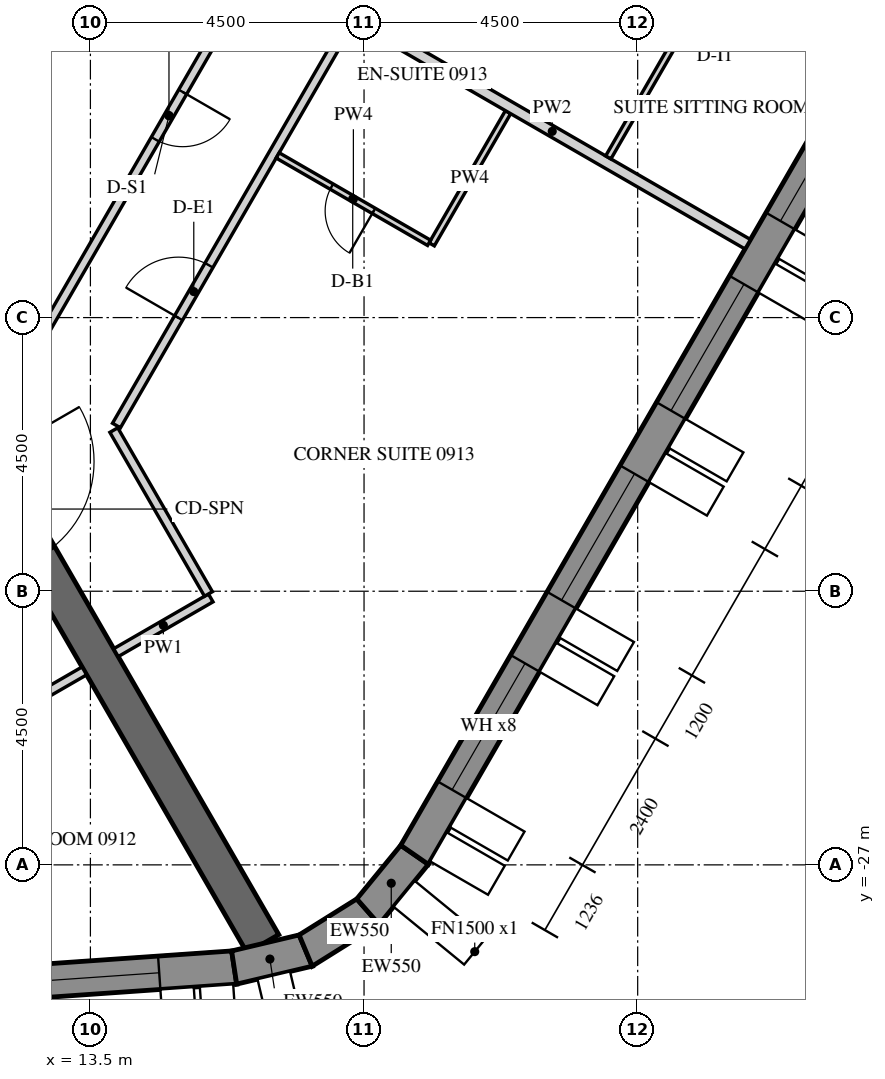
"""IFC4 building model, lengths in metres.
Left out: names, types, materials, properties, quantities, classifications, styles, units other than length and angle.
Written with IfcOpenShell. Run it as: python <this file> out.ifc"""

import sys

from ifc_helpers import new_model, si_unit, direction, frame, frame_2d, origin, place, context, subcontext, project, spatial, polyline, rectangle, outline, extrude, element, fill, save


model = new_model("IFC4")
c1 = context("Model", 3, precision=1e-05, world=origin(), true_north=direction((0.0, 1.0)))
c2 = subcontext(c1, "Body", "Model", "MODEL_VIEW")
j1 = project(units=[si_unit("LENGTHUNIT", "METRE"), si_unit("PLANEANGLEUNIT", "RADIAN")], contexts=[c1])
p1 = place(None, origin())
s1 = spatial("IfcSite", under=j1, at=p1, CompositionType="ELEMENT")
p2 = place(p1, origin())
s2 = spatial("IfcBuilding", under=s1, at=p2, CompositionType="ELEMENT")
p3 = place(p2, frame((0.0, 0.0, 123.3)))
s3 = spatial("IfcBuildingStorey", under=s2, at=p3, CompositionType="ELEMENT", Elevation=123.3)
p4 = place(p3, frame((-14.134, -30.786, -0.15), z_axis=(0.0, 0.0, 1.0), x_axis=(0.997564037441, 0.069756657061, 0.0)))
e1 = element("IfcWall", 1, at=p4, inside=s3, PredefinedType="SOLIDWALL", context=c2, shape_type="SweptSolid", body=[
    extrude(outline(polyline([(-0.026, -0.275), (30.094, -0.275), (30.049, 0.275), (0.026, 0.275), (-0.026, -0.275)])), origin(), (0.0, 0.0, 1.0), 3.9),
])
p5 = place(p4, frame((1.236, 0.0, 1.05)))
e2 = element("IfcOpeningElement", 2, at=p5, cuts=e1, PredefinedType="OPENING", context=c2, shape_type="SweptSolid", body=[
    extrude(rectangle(XDim=2.4, YDim=2.4, at=frame_2d((1.2, 1.2))), frame((0.0, 0.285, 0.0), z_axis=(0.0, -1.0, 0.0), x_axis=(1.0, 0.0, 0.0)), (0.0, 0.0, 1.0), 0.57),
])
p6 = place(p4, frame((4.835, 0.0, 1.05)))
e3 = element("IfcOpeningElement", 3, at=p6, cuts=e1, PredefinedType="OPENING", context=c2, shape_type="SweptSolid", body=[
    extrude(rectangle(XDim=2.4, YDim=2.4, at=frame_2d((1.2, 1.2))), frame((0.0, 0.285, 0.0), z_axis=(0.0, -1.0, 0.0), x_axis=(1.0, 0.0, 0.0)), (0.0, 0.0, 1.0), 0.57),
])
p7 = place(p4, frame((8.436, 0.0, 1.05)))
e4 = element("IfcOpeningElement", 4, at=p7, cuts=e1, PredefinedType="OPENING", context=c2, shape_type="SweptSolid", body=[
    extrude(rectangle(XDim=2.4, YDim=2.4, at=frame_2d((1.2, 1.2))), frame((0.0, 0.285, 0.0), z_axis=(0.0, -1.0, 0.0), x_axis=(1.0, 0.0, 0.0)), (0.0, 0.0, 1.0), 0.57),
])
p8 = place(p4, frame((12.035, 0.0, 1.05)))
e5 = element("IfcOpeningElement", 5, at=p8, cuts=e1, PredefinedType="OPENING", context=c2, shape_type="SweptSolid", body=[
    extrude(rectangle(XDim=2.4, YDim=2.4, at=frame_2d((1.2, 1.2))), frame((0.0, 0.285, 0.0), z_axis=(0.0, -1.0, 0.0), x_axis=(1.0, 0.0, 0.0)), (0.0, 0.0, 1.0), 0.57),
])
p9 = place(p4, frame((15.635, 0.0, 1.05)))
e6 = element("IfcOpeningElement", 6, at=p9, cuts=e1, PredefinedType="OPENING", context=c2, shape_type="SweptSolid", body=[
    extrude(rectangle(XDim=2.4, YDim=2.4, at=frame_2d((1.2, 1.2))), frame((0.0, 0.285, 0.0), z_axis=(0.0, -1.0, 0.0), x_axis=(1.0, 0.0, 0.0)), (0.0, 0.0, 1.0), 0.57),
])
p10 = place(p4, frame((19.236, 0.0, 1.05)))
e7 = element("IfcOpeningElement", 7, at=p10, cuts=e1, PredefinedType="OPENING", context=c2, shape_type="SweptSolid", body=[
    extrude(rectangle(XDim=2.4, YDim=2.4, at=frame_2d((1.2, 1.2))), frame((0.0, 0.285, 0.0), z_axis=(0.0, -1.0, 0.0), x_axis=(1.0, 0.0, 0.0)), (0.0, 0.0, 1.0), 0.57),
])
p11 = place(p4, frame((22.835, 0.0, 1.05)))
e8 = element("IfcOpeningElement", 8, at=p11, cuts=e1, PredefinedType="OPENING", context=c2, shape_type="SweptSolid", body=[
    extrude(rectangle(XDim=2.4, YDim=2.4, at=frame_2d((1.2, 1.2))), frame((0.0, 0.285, 0.0), z_axis=(0.0, -1.0, 0.0), x_axis=(1.0, 0.0, 0.0)), (0.0, 0.0, 1.0), 0.57),
])
p12 = place(p4, frame((26.436, 0.0, 1.05)))
e9 = element("IfcOpeningElement", 9, at=p12, cuts=e1, PredefinedType="OPENING", context=c2, shape_type="SweptSolid", body=[
    extrude(rectangle(XDim=2.4, YDim=2.4, at=frame_2d((1.2, 1.2))), frame((0.0, 0.285, 0.0), z_axis=(0.0, -1.0, 0.0), x_axis=(1.0, 0.0, 0.0)), (0.0, 0.0, 1.0), 0.57),
])
p13 = place(p3, frame((15.864, -28.688, -0.15), z_axis=(0.0, 0.0, 1.0), x_axis=(0.973063591128, 0.230536868247, 0.0)))
e10 = element("IfcWall", 10, at=p13, inside=s3, PredefinedType="SOLIDWALL", context=c2, shape_type="SweptSolid", body=[
    extrude(outline(polyline([(-0.022, -0.275), (1.253, -0.275), (1.163, 0.275), (0.022, 0.275), (-0.022, -0.275)])), origin(), (0.0, 0.0, 1.0), 3.9),
])
p14 = place(p3, frame((17.04, -28.41, -0.15), z_axis=(0.0, 0.0, 1.0), x_axis=(0.847952888306, 0.530071598195, 0.0)))
e11 = element("IfcWall", 11, at=p14, inside=s3, PredefinedType="SOLIDWALL", context=c2, shape_type="SweptSolid", body=[
    extrude(outline(polyline([(-0.045, -0.275), (1.253, -0.275), (1.163, 0.275), (0.045, 0.275), (-0.045, -0.275)])), origin(), (0.0, 0.0, 1.0), 3.9),
])
p15 = place(p3, frame((18.064, -27.769, -0.15), z_axis=(0.0, 0.0, 1.0), x_axis=(0.633842757806, 0.773461930787, 0.0)))
e12 = element("IfcWall", 12, at=p15, inside=s3, PredefinedType="SOLIDWALL", context=c2, shape_type="SweptSolid", body=[
    extrude(outline(polyline([(-0.045, -0.275), (1.231, -0.275), (1.186, 0.275), (0.045, 0.275), (-0.045, -0.275)])), origin(), (0.0, 0.0, 1.0), 3.9),
])
p16 = place(p3, frame((18.83, -26.835, -0.15), z_axis=(0.0, 0.0, 1.0), x_axis=(0.500003800416, 0.866023209602, 0.0)))
e13 = element("IfcWall", 13, at=p16, inside=s3, PredefinedType="SOLIDWALL", context=c2, shape_type="SweptSolid", body=[
    extrude(outline(polyline([(-0.022, -0.275), (30.097, -0.275), (30.045, 0.275), (0.022, 0.275), (-0.022, -0.275)])), origin(), (0.0, 0.0, 1.0), 3.9),
])
p17 = place(p16, frame((1.236, 0.0, 1.05)))
e14 = element("IfcOpeningElement", 14, at=p17, cuts=e13, PredefinedType="OPENING", context=c2, shape_type="SweptSolid", body=[
    extrude(rectangle(XDim=2.4, YDim=2.4, at=frame_2d((1.2, 1.2))), frame((0.0, 0.285, 0.0), z_axis=(0.0, -1.0, 0.0), x_axis=(1.0, 0.0, 0.0)), (0.0, 0.0, 1.0), 0.57),
])
p18 = place(p16, frame((4.835, 0.0, 1.05)))
e15 = element("IfcOpeningElement", 15, at=p18, cuts=e13, PredefinedType="OPENING", context=c2, shape_type="SweptSolid", body=[
    extrude(rectangle(XDim=2.4, YDim=2.4, at=frame_2d((1.2, 1.2))), frame((0.0, 0.285, 0.0), z_axis=(0.0, -1.0, 0.0), x_axis=(1.0, 0.0, 0.0)), (0.0, 0.0, 1.0), 0.57),
])
p19 = place(p16, frame((8.436, 0.0, 1.05)))
e16 = element("IfcOpeningElement", 16, at=p19, cuts=e13, PredefinedType="OPENING", context=c2, shape_type="SweptSolid", body=[
    extrude(rectangle(XDim=2.4, YDim=2.4, at=frame_2d((1.2, 1.2))), frame((0.0, 0.285, 0.0), z_axis=(0.0, -1.0, 0.0), x_axis=(1.0, 0.0, 0.0)), (0.0, 0.0, 1.0), 0.57),
])
p20 = place(p16, frame((12.035, 0.0, 1.05)))
e17 = element("IfcOpeningElement", 17, at=p20, cuts=e13, PredefinedType="OPENING", context=c2, shape_type="SweptSolid", body=[
    extrude(rectangle(XDim=2.4, YDim=2.4, at=frame_2d((1.2, 1.2))), frame((0.0, 0.285, 0.0), z_axis=(0.0, -1.0, 0.0), x_axis=(1.0, 0.0, 0.0)), (0.0, 0.0, 1.0), 0.57),
])
p21 = place(p16, frame((15.635, 0.0, 1.05)))
e18 = element("IfcOpeningElement", 18, at=p21, cuts=e13, PredefinedType="OPENING", context=c2, shape_type="SweptSolid", body=[
    extrude(rectangle(XDim=2.4, YDim=2.4, at=frame_2d((1.2, 1.2))), frame((0.0, 0.285, 0.0), z_axis=(0.0, -1.0, 0.0), x_axis=(1.0, 0.0, 0.0)), (0.0, 0.0, 1.0), 0.57),
])
p22 = place(p16, frame((19.236, 0.0, 1.05)))
e19 = element("IfcOpeningElement", 19, at=p22, cuts=e13, PredefinedType="OPENING", context=c2, shape_type="SweptSolid", body=[
    extrude(rectangle(XDim=2.4, YDim=2.4, at=frame_2d((1.2, 1.2))), frame((0.0, 0.285, 0.0), z_axis=(0.0, -1.0, 0.0), x_axis=(1.0, 0.0, 0.0)), (0.0, 0.0, 1.0), 0.57),
])
p23 = place(p16, frame((22.835, 0.0, 1.05)))
e20 = element("IfcOpeningElement", 20, at=p23, cuts=e13, PredefinedType="OPENING", context=c2, shape_type="SweptSolid", body=[
    extrude(rectangle(XDim=2.4, YDim=2.4, at=frame_2d((1.2, 1.2))), frame((0.0, 0.285, 0.0), z_axis=(0.0, -1.0, 0.0), x_axis=(1.0, 0.0, 0.0)), (0.0, 0.0, 1.0), 0.57),
])
p24 = place(p16, frame((26.436, 0.0, 1.05)))
e21 = element("IfcOpeningElement", 21, at=p24, cuts=e13, PredefinedType="OPENING", context=c2, shape_type="SweptSolid", body=[
    extrude(rectangle(XDim=2.4, YDim=2.4, at=frame_2d((1.2, 1.2))), frame((0.0, 0.285, 0.0), z_axis=(0.0, -1.0, 0.0), x_axis=(1.0, 0.0, 0.0)), (0.0, 0.0, 1.0), 0.57),
])
p25 = place(p3, frame((7.91, -13.7, -0.15), z_axis=(0.0, 0.0, 1.0), x_axis=(0.499999880136, 0.866025472988, 0.0)))
e22 = element("IfcWall", 22, at=p25, inside=s3, PredefinedType="SHEAR", context=c2, shape_type="SweptSolid", body=[
    extrude(outline(polyline([(-0.173, -0.3), (15.993, -0.3), (15.646, 0.3), (0.173, 0.3), (-0.173, -0.3)])), origin(), (0.0, 0.0, 1.0), 3.9),
])
p26 = place(p25, frame((7.039, 0.0, 0.15)))
e23 = element("IfcOpeningElement", 23, at=p26, cuts=e22, PredefinedType="OPENING", context=c2, shape_type="SweptSolid", body=[
    extrude(rectangle(XDim=1.8, YDim=2.4, at=frame_2d((0.9, 1.2))), frame((0.0, 0.31, 0.0), z_axis=(0.0, -1.0, 0.0), x_axis=(1.0, 0.0, 0.0)), (0.0, 0.0, 1.0), 0.62),
])
p27 = place(p3, frame((8.083, -14.0, -0.15), z_axis=(0.0, 0.0, 1.0), x_axis=(0.499997680643, -0.866026742862, 0.0)))
e24 = element("IfcWall", 24, at=p27, inside=s3, PredefinedType="SHEAR", context=c2, shape_type="SweptSolid", body=[
    extrude(rectangle(XDim=16.509, YDim=0.6, at=frame_2d((8.254, 0.0))), origin(), (0.0, 0.0, 1.0), 3.9),
])
p28 = place(p27, frame((7.354, 0.0, 0.15)))
e25 = element("IfcOpeningElement", 25, at=p28, cuts=e24, PredefinedType="OPENING", context=c2, shape_type="SweptSolid", body=[
    extrude(rectangle(XDim=1.8, YDim=2.4, at=frame_2d((0.9, 1.2))), frame((0.0, 0.31, 0.0), z_axis=(0.0, -1.0, 0.0), x_axis=(1.0, 0.0, 0.0)), (0.0, 0.0, 1.0), 0.62),
])
p29 = place(p3, frame((11.906, -24.673, 0.0), z_axis=(0.0, 0.0, 1.0), x_axis=(0.866013532718, 0.500020560727, 0.0)))
e26 = element("IfcWall", 26, at=p29, inside=s3, PredefinedType="PARTITIONING", context=c2, shape_type="SweptSolid", body=[
    extrude(rectangle(XDim=1.725, YDim=0.15, at=frame_2d((0.863, 0.0))), origin(), (0.0, 0.0, 1.0), 2.988),
])
p30 = place(p3, frame((13.92, -23.51, 0.0), z_axis=(0.0, 0.0, 1.0), x_axis=(0.866047807691, 0.499961193289, 0.0)))
e27 = element("IfcWall", 27, at=p30, inside=s3, PredefinedType="PARTITIONING", context=c2, shape_type="SweptSolid", body=[
    extrude(rectangle(XDim=1.8, YDim=0.15, at=frame_2d((0.9, 0.0))), origin(), (0.0, 0.0, 1.0), 2.988),
])
p31 = place(p3, frame((15.441, -22.545, 0.0), z_axis=(0.0, 0.0, 1.0), x_axis=(-0.500037089193, 0.86600398927, 0.0)))
e28 = element("IfcWall", 28, at=p31, inside=s3, PredefinedType="PARTITIONING", context=c2, shape_type="SweptSolid", body=[
    extrude(rectangle(XDim=3.112, YDim=0.15, at=frame_2d((1.556, 0.0))), origin(), (0.0, 0.0, 1.0), 2.988),
])
p32 = place(p3, frame((13.928, -19.775, 0.0), z_axis=(0.0, 0.0, 1.0), x_axis=(0.50000450071, 0.866022805283, 0.0)))
e29 = element("IfcWall", 29, at=p32, inside=s3, PredefinedType="PARTITIONING", context=c2, shape_type="SweptSolid", body=[
    extrude(rectangle(XDim=23.877, YDim=0.15, at=frame_2d((11.938, 0.0))), origin(), (0.0, 0.0, 1.0), 2.988),
])
p33 = place(p32, frame((2.043, 0.0, 0.0)))
e30 = element("IfcOpeningElement", 30, at=p33, cuts=e29, PredefinedType="OPENING", context=c2, shape_type="SweptSolid", body=[
    extrude(rectangle(XDim=1.0, YDim=2.1, at=frame_2d((0.5, 1.05))), frame((0.0, 0.085, 0.0), z_axis=(0.0, -1.0, 0.0), x_axis=(1.0, 0.0, 0.0)), (0.0, 0.0, 1.0), 0.17),
])
p34 = place(p32, frame((13.272, 0.0, 0.0)))
e31 = element("IfcOpeningElement", 31, at=p34, cuts=e29, PredefinedType="OPENING", context=c2, shape_type="SweptSolid", body=[
    extrude(rectangle(XDim=1.0, YDim=2.1, at=frame_2d((0.5, 1.05))), frame((0.0, 0.085, 0.0), z_axis=(0.0, -1.0, 0.0), x_axis=(1.0, 0.0, 0.0)), (0.0, 0.0, 1.0), 0.17),
])
p35 = place(p3, frame((16.902, -11.024, 0.0), z_axis=(0.0, 0.0, 1.0), x_axis=(-0.499999527968, -0.866025676312, 0.0)))
e32 = element("IfcWall", 32, at=p35, inside=s3, PredefinedType="PARTITIONING", context=c2, shape_type="SweptSolid", body=[
    extrude(rectangle(XDim=8.441, YDim=0.15, at=frame_2d((4.22, 0.0))), origin(), (0.0, 0.0, 1.0), 2.988),
])
p36 = place(p35, frame((3.771, 0.0, 0.0)))
e33 = element("IfcOpeningElement", 33, at=p36, cuts=e32, PredefinedType="OPENING", context=c2, shape_type="SweptSolid", body=[
    extrude(rectangle(XDim=0.9, YDim=2.1, at=frame_2d((0.45, 1.05))), frame((0.0, 0.085, 0.0), z_axis=(0.0, -1.0, 0.0), x_axis=(1.0, 0.0, 0.0)), (0.0, 0.0, 1.0), 0.17),
])
p37 = place(p3, frame((20.368, -14.622, 0.0), z_axis=(0.0, 0.0, 1.0), x_axis=(-0.50001992892, -0.866013897511, 0.0)))
e34 = element("IfcWall", 34, at=p37, inside=s3, PredefinedType="PARTITIONING", context=c2, shape_type="SweptSolid", body=[
    extrude(rectangle(XDim=2.51, YDim=0.1, at=frame_2d((1.255, 0.0))), origin(), (0.0, 0.0, 1.0), 2.988),
])
p38 = place(p3, frame((19.07, -16.771, 0.0), z_axis=(0.0, 0.0, 1.0), x_axis=(-0.866018712932, 0.500011588718, 0.0)))
e35 = element("IfcWall", 35, at=p38, inside=s3, PredefinedType="PARTITIONING", context=c2, shape_type="SweptSolid", body=[
    extrude(rectangle(XDim=2.875, YDim=0.1, at=frame_2d((1.438, 0.0))), origin(), (0.0, 0.0, 1.0), 2.988),
])
p39 = place(p38, frame((1.05, 0.0, 0.0)))
e36 = element("IfcOpeningElement", 36, at=p39, cuts=e35, PredefinedType="OPENING", context=c2, shape_type="SweptSolid", body=[
    extrude(rectangle(XDim=0.8, YDim=2.1, at=frame_2d((0.4, 1.05))), frame((0.0, 0.06, 0.0), z_axis=(0.0, -1.0, 0.0), x_axis=(1.0, 0.0, 0.0)), (0.0, 0.0, 1.0), 0.12),
])
p40 = place(p3, frame((24.31, -16.794, 0.0), z_axis=(0.0, 0.0, 1.0), x_axis=(-0.866022965479, 0.500004223245, 0.0)))
e37 = element("IfcWall", 37, at=p40, inside=s3, PredefinedType="PARTITIONING", context=c2, shape_type="SweptSolid", body=[
    extrude(rectangle(XDim=7.425, YDim=0.18, at=frame_2d((3.713, 0.0))), origin(), (0.0, 0.0, 1.0), 2.988),
])
p41 = place(p3, frame((22.017, -15.366, 0.0), z_axis=(0.0, 0.0, 1.0), x_axis=(0.5000167099, 0.866015756104, 0.0)))
e38 = element("IfcWall", 38, at=p41, inside=s3, PredefinedType="PARTITIONING", context=c2, shape_type="SweptSolid", body=[
    extrude(rectangle(XDim=7.11, YDim=0.1, at=frame_2d((3.555, 0.0))), origin(), (0.0, 0.0, 1.0), 2.988),
])
p42 = place(p41, frame((3.06, 0.0, 0.0)))
e39 = element("IfcOpeningElement", 39, at=p42, cuts=e38, PredefinedType="OPENING", context=c2, shape_type="SweptSolid", body=[
    extrude(rectangle(XDim=0.9, YDim=2.1, at=frame_2d((0.45, 1.05))), frame((0.0, 0.06, 0.0), z_axis=(0.0, -1.0, 0.0), x_axis=(1.0, 0.0, 0.0)), (0.0, 0.0, 1.0), 0.12),
])
p43 = place(p12, frame((0.0, 0.205, 0.0)))
e40 = element("IfcWindow", 40, at=p43, inside=s3, PartitioningType="DOUBLE_PANEL_VERTICAL", PredefinedType="WINDOW", context=c2, shape_type="SweptSolid", body=[
    extrude(rectangle(XDim=2.4, YDim=2.4, at=frame_2d((1.2, 1.2))), frame((0.0, 0.03, 0.0), z_axis=(0.0, -1.0, 0.0), x_axis=(1.0, 0.0, 0.0)), (0.0, 0.0, 1.0), 0.06),
])
fill(e9, e40)
p44 = place(p17, frame((0.0, 0.205, 0.0)))
e41 = element("IfcWindow", 41, at=p44, inside=s3, PartitioningType="DOUBLE_PANEL_VERTICAL", PredefinedType="WINDOW", context=c2, shape_type="SweptSolid", body=[
    extrude(rectangle(XDim=2.4, YDim=2.4, at=frame_2d((1.2, 1.2))), frame((0.0, 0.03, 0.0), z_axis=(0.0, -1.0, 0.0), x_axis=(1.0, 0.0, 0.0)), (0.0, 0.0, 1.0), 0.06),
])
fill(e14, e41)
p45 = place(p18, frame((0.0, 0.205, 0.0)))
e42 = element("IfcWindow", 42, at=p45, inside=s3, PartitioningType="DOUBLE_PANEL_VERTICAL", PredefinedType="WINDOW", context=c2, shape_type="SweptSolid", body=[
    extrude(rectangle(XDim=2.4, YDim=2.4, at=frame_2d((1.2, 1.2))), frame((0.0, 0.03, 0.0), z_axis=(0.0, -1.0, 0.0), x_axis=(1.0, 0.0, 0.0)), (0.0, 0.0, 1.0), 0.06),
])
fill(e15, e42)
p46 = place(p19, frame((0.0, 0.205, 0.0)))
e43 = element("IfcWindow", 43, at=p46, inside=s3, PartitioningType="DOUBLE_PANEL_VERTICAL", PredefinedType="WINDOW", context=c2, shape_type="SweptSolid", body=[
    extrude(rectangle(XDim=2.4, YDim=2.4, at=frame_2d((1.2, 1.2))), frame((0.0, 0.03, 0.0), z_axis=(0.0, -1.0, 0.0), x_axis=(1.0, 0.0, 0.0)), (0.0, 0.0, 1.0), 0.06),
])
fill(e16, e43)
p47 = place(p20, frame((0.0, 0.205, 0.0)))
e44 = element("IfcWindow", 44, at=p47, inside=s3, PartitioningType="DOUBLE_PANEL_VERTICAL", PredefinedType="WINDOW", context=c2, shape_type="SweptSolid", body=[
    extrude(rectangle(XDim=2.4, YDim=2.4, at=frame_2d((1.2, 1.2))), frame((0.0, 0.03, 0.0), z_axis=(0.0, -1.0, 0.0), x_axis=(1.0, 0.0, 0.0)), (0.0, 0.0, 1.0), 0.06),
])
fill(e17, e44)
p48 = place(p33, origin())
e45 = element("IfcDoor", 45, at=p48, inside=s3, OperationType="SINGLE_SWING_RIGHT", PredefinedType="DOOR", context=c2, shape_type="SweptSolid", body=[
    extrude(rectangle(XDim=1.0, YDim=2.1, at=frame_2d((0.5, 1.05))), frame((0.0, 0.025, 0.0), z_axis=(0.0, -1.0, 0.0), x_axis=(1.0, 0.0, 0.0)), (0.0, 0.0, 1.0), 0.05),
])
fill(e30, e45)
p49 = place(p39, origin())
e46 = element("IfcDoor", 46, at=p49, inside=s3, OperationType="SINGLE_SWING_LEFT", PredefinedType="DOOR", context=c2, shape_type="SweptSolid", body=[
    extrude(rectangle(XDim=0.8, YDim=2.1, at=frame_2d((0.4, 1.05))), frame((0.0, 0.025, 0.0), z_axis=(0.0, -1.0, 0.0), x_axis=(1.0, 0.0, 0.0)), (0.0, 0.0, 1.0), 0.05),
])
fill(e36, e46)
p50 = place(p36, origin())
e47 = element("IfcDoor", 47, at=p50, inside=s3, OperationType="SINGLE_SWING_RIGHT", PredefinedType="DOOR", context=c2, shape_type="SweptSolid", body=[
    extrude(rectangle(XDim=0.9, YDim=2.1, at=frame_2d((0.45, 1.05))), frame((0.0, 0.025, 0.0), z_axis=(0.0, -1.0, 0.0), x_axis=(1.0, 0.0, 0.0)), (0.0, 0.0, 1.0), 0.05),
])
fill(e33, e47)
save(model, sys.argv[1])
